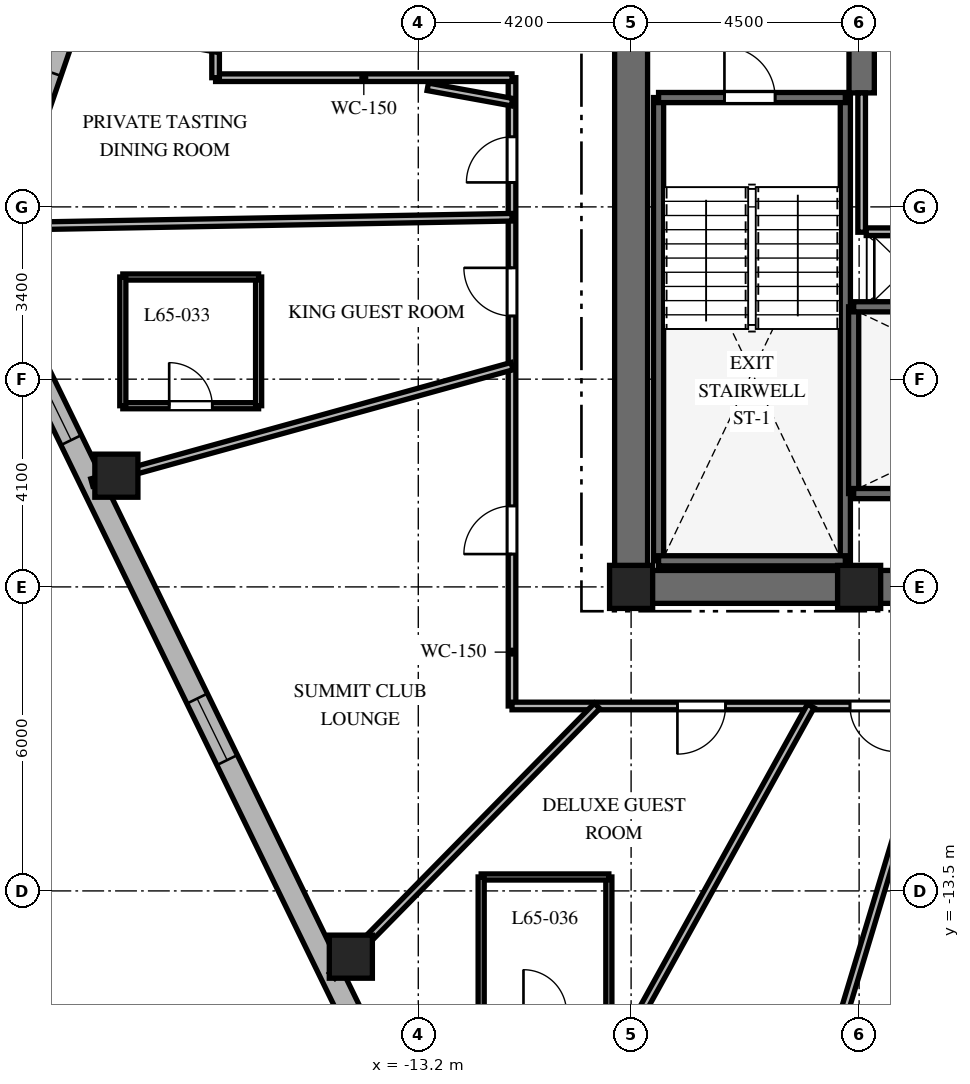
"""IFC4 building model, lengths in metres.
Left out: names, types, materials, properties, quantities, classifications, styles, units other than length and angle.
Written with IfcOpenShell. Run it as: python <this file> out.ifc"""

import sys

from ifc_helpers import new_model, si_unit, direction, frame, frame_2d, origin, origin_2d, place, context, subcontext, project, spatial, rectangle, extrude, element, fill, save


model = new_model("IFC4")
c1 = context("Model", 3, precision=1e-05, world=origin(), true_north=direction((0.0, 1.0)))
c2 = subcontext(c1, "Body", "Model", "MODEL_VIEW")
j1 = project(units=[si_unit("LENGTHUNIT", "METRE"), si_unit("PLANEANGLEUNIT", "RADIAN")], contexts=[c1])
p1 = place(None, origin())
s1 = spatial("IfcSite", under=j1, at=p1, CompositionType="ELEMENT")
p2 = place(p1, origin())
s2 = spatial("IfcBuilding", under=s1, at=p2, CompositionType="ELEMENT")
p3 = place(p2, frame((0.0, 0.0, 261.3)))
s3 = spatial("IfcBuildingStorey", under=s2, at=p3, CompositionType="ELEMENT", Elevation=261.3)
p4 = place(p3, frame((-9.325, -7.5, 0.0), z_axis=(0.0, 0.0, 1.0), x_axis=(1.0, 0.0, 0.0)))
e1 = element("IfcWall", 1, at=p4, inside=s3, PredefinedType="SHEAR", context=c2, shape_type="SweptSolid", body=[
    extrude(rectangle(XDim=18.65, YDim=0.65, at=frame_2d((9.325, 0.0))), origin(), (0.0, 0.0, 1.0), 3.9),
])
p5 = place(p4, frame((9.375, 0.0, 0.0)))
e2 = element("IfcOpeningElement", 2, at=p5, cuts=e1, PredefinedType="OPENING", context=c2, shape_type="SweptSolid", body=[
    extrude(rectangle(XDim=1.0, YDim=2.15, at=frame_2d((0.5, 1.075))), frame((0.0, 0.335, 0.0), z_axis=(0.0, -1.0, 0.0), x_axis=(1.0, 0.0, 0.0)), (0.0, 0.0, 1.0), 0.67),
])
p6 = place(p3, frame((-9.0, -7.175, 0.0), z_axis=(0.0, 0.0, 1.0), x_axis=(0.0, 1.0, 0.0)))
e3 = element("IfcWall", 3, at=p6, inside=s3, PredefinedType="SHEAR", context=c2, shape_type="SweptSolid", body=[
    extrude(rectangle(XDim=14.35, YDim=0.65, at=frame_2d((7.175, 0.0))), origin(), (0.0, 0.0, 1.0), 3.9),
])
p7 = place(p6, frame((10.3, 0.0, 0.0)))
e4 = element("IfcOpeningElement", 4, at=p7, cuts=e3, PredefinedType="OPENING", context=c2, shape_type="SweptSolid", body=[
    extrude(rectangle(XDim=1.05, YDim=2.15, at=frame_2d((0.525, 1.075))), frame((0.0, 0.335, 0.0), z_axis=(0.0, -1.0, 0.0), x_axis=(1.0, 0.0, 0.0)), (0.0, 0.0, 1.0), 0.67),
])
p8 = place(p3, frame((-4.45, 2.25, 0.0), z_axis=(0.0, 0.0, 1.0), x_axis=(0.0, 1.0, 0.0)))
e5 = element("IfcWall", 5, at=p8, inside=s3, PredefinedType="SHEAR", context=c2, shape_type="SweptSolid", body=[
    extrude(rectangle(XDim=4.925, YDim=0.5, at=frame_2d((2.462, 0.0))), origin(), (0.0, 0.0, 1.0), 3.9),
])
for number, where, z_axis, x_axis in (
    (6, (-8.458, -6.985, 0.0), (0.0, 0.0, 1.0), (0.0, 1.0, 0.0)),
    (7, (-4.772, -6.985, 0.0), (0.0, 0.0, 1.0), (0.0, 1.0, 0.0)),
):
    element("IfcWall", number, at=place(p3, frame(where, z_axis=z_axis, x_axis=x_axis)), inside=s3, PredefinedType="SHEAR", context=c2, shape_type="SweptSolid", body=[
        extrude(rectangle(XDim=9.143, YDim=0.2, at=frame_2d((4.572, 0.0))), origin(), (0.0, 0.0, 1.0), 3.9),
    ])
p9 = place(p3, frame((-8.458, -6.985, 0.0), z_axis=(0.0, 0.0, 1.0), x_axis=(1.0, 0.0, 0.0)))
e8 = element("IfcWall", 8, at=p9, inside=s3, PredefinedType="SHEAR", context=c2, shape_type="SweptSolid", body=[
    extrude(rectangle(XDim=3.686, YDim=0.2, at=frame_2d((1.843, 0.0))), origin(), (0.0, 0.0, 1.0), 3.9),
])
p10 = place(p3, frame((-8.458, 2.158, 0.0), z_axis=(0.0, 0.0, 1.0), x_axis=(1.0, 0.0, 0.0)))
e9 = element("IfcWall", 9, at=p10, inside=s3, PredefinedType="SHEAR", context=c2, shape_type="SweptSolid", body=[
    extrude(rectangle(XDim=3.686, YDim=0.2, at=frame_2d((1.843, 0.0))), origin(), (0.0, 0.0, 1.0), 3.9),
])
p11 = place(p10, frame((1.3, 0.0, 0.0)))
e10 = element("IfcOpeningElement", 10, at=p11, cuts=e9, PredefinedType="OPENING", context=c2, shape_type="SweptSolid", body=[
    extrude(rectangle(XDim=1.0, YDim=2.15, at=frame_2d((0.5, 1.075))), frame((0.0, 0.11, 0.0), z_axis=(0.0, -1.0, 0.0), x_axis=(1.0, 0.0, 0.0)), (0.0, 0.0, 1.0), 0.22),
])
p12 = place(p3, frame((-4.608, -5.658, 0.0), z_axis=(0.0, 0.0, 1.0), x_axis=(0.0, 1.0, 0.0)))
e11 = element("IfcWall", 11, at=p12, inside=s3, PredefinedType="SHEAR", context=c2, shape_type="SweptSolid", body=[
    extrude(rectangle(XDim=3.686, YDim=0.2, at=frame_2d((1.843, 0.0))), origin(), (0.0, 0.0, 1.0), 3.9),
])
p13 = place(p3, frame((-4.608, -5.658, 0.0), z_axis=(0.0, 0.0, 1.0), x_axis=(1.0, 0.0, 0.0)))
e12 = element("IfcWall", 12, at=p13, inside=s3, PredefinedType="SHEAR", context=c2, shape_type="SweptSolid", body=[
    extrude(rectangle(XDim=9.166, YDim=0.2, at=frame_2d((4.583, 0.0))), origin(), (0.0, 0.0, 1.0), 3.9),
])
p14 = place(p13, frame((7.45, 0.0, 0.0)))
e13 = element("IfcOpeningElement", 13, at=p14, cuts=e12, PredefinedType="OPENING", context=c2, shape_type="SweptSolid", body=[
    extrude(rectangle(XDim=1.0, YDim=2.15, at=frame_2d((0.5, 1.075))), frame((0.0, 0.11, 0.0), z_axis=(0.0, -1.0, 0.0), x_axis=(1.0, 0.0, 0.0)), (0.0, 0.0, 1.0), 0.22),
])
p15 = place(p3, frame((-4.608, -1.972, 0.0), z_axis=(0.0, 0.0, 1.0), x_axis=(1.0, 0.0, 0.0)))
e14 = element("IfcWall", 14, at=p15, inside=s3, PredefinedType="SHEAR", context=c2, shape_type="SweptSolid", body=[
    extrude(rectangle(XDim=9.166, YDim=0.2, at=frame_2d((4.583, 0.0))), origin(), (0.0, 0.0, 1.0), 3.9),
])
for number, where, z_axis, x_axis in (
    (15, (-9.0, -7.5, 0.0), (0.0, 0.0, 1.0), (1.0, 0.0, 0.0)),
    (16, (-4.5, -7.5, 0.0), (0.0, 0.0, 1.0), (1.0, 0.0, 0.0)),
    (17, (-19.158, -5.305, 0.0), (0.0, 0.0, 1.0), (1.0, 0.0, 0.0)),
    (18, (-14.531, -14.798, 0.0), (0.0, 0.0, 1.0), (1.0, 0.0, 0.0)),
):
    element("IfcColumn", number, at=place(p3, frame(where, z_axis=z_axis, x_axis=x_axis)), inside=s3, PredefinedType="COLUMN", context=c2, shape_type="SweptSolid", body=[
        extrude(rectangle(XDim=0.85, YDim=0.85, at=origin_2d()), origin(), (0.0, 0.0, 1.0), 3.9),
    ])
p16 = place(p3, frame((-15.26, 17.776, 0.0), z_axis=(0.0, 0.0, 1.0), x_axis=(-0.325407437101, -0.945573899745, 0.0)))
e19 = element("IfcWall", 19, at=p16, inside=s3, PredefinedType="SOLIDWALL", context=c2, shape_type="SweptSolid", body=[
    extrude(rectangle(XDim=18.552, YDim=0.45, at=frame_2d((9.276, 0.0))), origin(), (0.0, 0.0, 1.0), 3.6),
])
p17 = place(p16, frame((4.602, 0.0, 0.0)))
e20 = element("IfcOpeningElement", 20, at=p17, cuts=e19, PredefinedType="OPENING", context=c2, shape_type="SweptSolid", body=[
    extrude(rectangle(XDim=1.0, YDim=2.15, at=frame_2d((0.5, 1.075))), frame((0.0, 0.235, 0.0), z_axis=(0.0, -1.0, 0.0), x_axis=(1.0, 0.0, 0.0)), (0.0, 0.0, 1.0), 0.47),
])
p18 = place(p16, frame((1.161, 0.0, 0.8)))
e21 = element("IfcOpeningElement", 21, at=p18, cuts=e19, PredefinedType="OPENING", context=c2, shape_type="SweptSolid", body=[
    extrude(rectangle(XDim=1.35, YDim=1.75, at=frame_2d((0.675, 0.875))), frame((0.0, 0.235, 0.0), z_axis=(0.0, -1.0, 0.0), x_axis=(1.0, 0.0, 0.0)), (0.0, 0.0, 1.0), 0.47),
])
p19 = place(p16, frame((6.379, 0.0, 0.8)))
e22 = element("IfcOpeningElement", 22, at=p19, cuts=e19, PredefinedType="OPENING", context=c2, shape_type="SweptSolid", body=[
    extrude(rectangle(XDim=1.35, YDim=1.75, at=frame_2d((0.675, 0.875))), frame((0.0, 0.235, 0.0), z_axis=(0.0, -1.0, 0.0), x_axis=(1.0, 0.0, 0.0)), (0.0, 0.0, 1.0), 0.47),
])
p20 = place(p16, frame((11.561, 0.0, 0.8)))
e23 = element("IfcOpeningElement", 23, at=p20, cuts=e19, PredefinedType="OPENING", context=c2, shape_type="SweptSolid", body=[
    extrude(rectangle(XDim=1.35, YDim=1.75, at=frame_2d((0.675, 0.875))), frame((0.0, 0.235, 0.0), z_axis=(0.0, -1.0, 0.0), x_axis=(1.0, 0.0, 0.0)), (0.0, 0.0, 1.0), 0.47),
])
p21 = place(p16, frame((15.987, 0.0, 0.8)))
e24 = element("IfcOpeningElement", 24, at=p21, cuts=e19, PredefinedType="OPENING", context=c2, shape_type="SweptSolid", body=[
    extrude(rectangle(XDim=1.35, YDim=1.75, at=frame_2d((0.675, 0.875))), frame((0.0, 0.235, 0.0), z_axis=(0.0, -1.0, 0.0), x_axis=(1.0, 0.0, 0.0)), (0.0, 0.0, 1.0), 0.47),
])
p22 = place(p3, frame((-21.138, -2.371, 0.0), z_axis=(0.0, 0.0, 1.0), x_axis=(0.438128124058, -0.89891253574, 0.0)))
e25 = element("IfcWall", 25, at=p22, inside=s3, PredefinedType="SOLIDWALL", context=c2, shape_type="SweptSolid", body=[
    extrude(rectangle(XDim=17.565, YDim=0.45, at=frame_2d((8.782, 0.0))), origin(), (0.0, 0.0, 1.0), 3.6),
])
p23 = place(p22, frame((1.133, 0.0, 0.8)))
e26 = element("IfcOpeningElement", 26, at=p23, cuts=e25, PredefinedType="OPENING", context=c2, shape_type="SweptSolid", body=[
    extrude(rectangle(XDim=1.35, YDim=1.75, at=frame_2d((0.675, 0.875))), frame((0.0, 0.235, 0.0), z_axis=(0.0, -1.0, 0.0), x_axis=(1.0, 0.0, 0.0)), (0.0, 0.0, 1.0), 0.47),
])
p24 = place(p22, frame((8.158, 0.0, 0.8)))
e27 = element("IfcOpeningElement", 27, at=p24, cuts=e25, PredefinedType="OPENING", context=c2, shape_type="SweptSolid", body=[
    extrude(rectangle(XDim=1.35, YDim=1.75, at=frame_2d((0.675, 0.875))), frame((0.0, 0.235, 0.0), z_axis=(0.0, -1.0, 0.0), x_axis=(1.0, 0.0, 0.0)), (0.0, 0.0, 1.0), 0.47),
])
p25 = place(p22, frame((15.132, 0.0, 0.8)))
e28 = element("IfcOpeningElement", 28, at=p25, cuts=e25, PredefinedType="OPENING", context=c2, shape_type="SweptSolid", body=[
    extrude(rectangle(XDim=1.35, YDim=1.75, at=frame_2d((0.675, 0.875))), frame((0.0, 0.235, 0.0), z_axis=(0.0, -1.0, 0.0), x_axis=(1.0, 0.0, 0.0)), (0.0, 0.0, 1.0), 0.47),
])
p26 = place(p3, frame((-4.45, -0.5, 0.0), z_axis=(0.0, 0.0, 1.0), x_axis=(0.0, 1.0, 0.0)))
e29 = element("IfcWall", 29, at=p26, inside=s3, PredefinedType="PARTITIONING", context=c2, shape_type="SweptSolid", body=[
    extrude(rectangle(XDim=2.75, YDim=0.15, at=frame_2d((1.375, 0.0))), origin(), (0.0, 0.0, 1.0), 3.6),
])
p27 = place(p3, frame((-4.36, -0.49, 0.0), z_axis=(0.0, 0.0, 1.0), x_axis=(1.0, 0.0, 0.0)))
e30 = element("IfcWall", 30, at=p27, inside=s3, PredefinedType="PARTITIONING", context=c2, shape_type="SweptSolid", body=[
    extrude(rectangle(XDim=8.72, YDim=0.15, at=frame_2d((4.36, 0.0))), origin(), (0.0, 0.0, 1.0), 3.6),
])
p28 = place(p27, frame((2.81, 0.0, 0.0)))
e31 = element("IfcOpeningElement", 31, at=p28, cuts=e30, PredefinedType="OPENING", context=c2, shape_type="SweptSolid", body=[
    extrude(rectangle(XDim=0.85, YDim=2.03, at=frame_2d((0.425, 1.015))), frame((0.0, 0.085, 0.0), z_axis=(0.0, -1.0, 0.0), x_axis=(1.0, 0.0, 0.0)), (0.0, 0.0, 1.0), 0.17),
])
p29 = place(p27, frame((4.61, 0.0, 0.0)))
e32 = element("IfcOpeningElement", 32, at=p29, cuts=e30, PredefinedType="OPENING", context=c2, shape_type="SweptSolid", body=[
    extrude(rectangle(XDim=0.85, YDim=2.03, at=frame_2d((0.425, 1.015))), frame((0.0, 0.085, 0.0), z_axis=(0.0, -1.0, 0.0), x_axis=(1.0, 0.0, 0.0)), (0.0, 0.0, 1.0), 0.17),
])
p30 = place(p3, frame((-11.35, -9.85, 0.0), z_axis=(0.0, 0.0, 1.0), x_axis=(0.0, 1.0, 0.0)))
e33 = element("IfcWall", 33, at=p30, inside=s3, PredefinedType="PARTITIONING", context=c2, shape_type="SweptSolid", body=[
    extrude(rectangle(XDim=12.4, YDim=0.15, at=frame_2d((6.2, 0.0))), origin(), (0.0, 0.0, 1.0), 3.09),
])
p31 = place(p30, frame((10.333, 0.0, 0.0)))
e34 = element("IfcOpeningElement", 34, at=p31, cuts=e33, PredefinedType="OPENING", context=c2, shape_type="SweptSolid", body=[
    extrude(rectangle(XDim=0.9, YDim=2.03, at=frame_2d((0.45, 1.015))), frame((0.0, 0.085, 0.0), z_axis=(0.0, -1.0, 0.0), x_axis=(1.0, 0.0, 0.0)), (0.0, 0.0, 1.0), 0.17),
])
p32 = place(p30, frame((7.697, 0.0, 0.0)))
e35 = element("IfcOpeningElement", 35, at=p32, cuts=e33, PredefinedType="OPENING", context=c2, shape_type="SweptSolid", body=[
    extrude(rectangle(XDim=0.95, YDim=2.03, at=frame_2d((0.475, 1.015))), frame((0.0, 0.085, 0.0), z_axis=(0.0, -1.0, 0.0), x_axis=(1.0, 0.0, 0.0)), (0.0, 0.0, 1.0), 0.17),
])
p33 = place(p30, frame((2.998, 0.0, 0.0)))
e36 = element("IfcOpeningElement", 36, at=p33, cuts=e33, PredefinedType="OPENING", context=c2, shape_type="SweptSolid", body=[
    extrude(rectangle(XDim=0.95, YDim=2.03, at=frame_2d((0.475, 1.015))), frame((0.0, 0.085, 0.0), z_axis=(0.0, -1.0, 0.0), x_axis=(1.0, 0.0, 0.0)), (0.0, 0.0, 1.0), 0.17),
])
p34 = place(p3, frame((-11.35, 2.55, 0.0), z_axis=(0.0, 0.0, 1.0), x_axis=(-1.0, 0.0, 0.0)))
e37 = element("IfcWall", 37, at=p34, inside=s3, PredefinedType="PARTITIONING", context=c2, shape_type="SweptSolid", body=[
    extrude(rectangle(XDim=5.85, YDim=0.15, at=frame_2d((2.925, 0.0))), origin(), (0.0, 0.0, 1.0), 3.041),
])
p35 = place(p3, frame((-17.2, 2.55, 0.0), z_axis=(0.0, 0.0, 1.0), x_axis=(0.0, 1.0, 0.0)))
e38 = element("IfcWall", 38, at=p35, inside=s3, PredefinedType="PARTITIONING", context=c2, shape_type="SweptSolid", body=[
    extrude(rectangle(XDim=1.85, YDim=0.15, at=frame_2d((0.925, 0.0))), origin(), (0.0, 0.0, 1.0), 3.09),
])
p36 = place(p3, frame((-0.92, -9.85, 0.0), z_axis=(0.0, 0.0, 1.0), x_axis=(-1.0, 0.0, 0.0)))
e39 = element("IfcWall", 39, at=p36, inside=s3, PredefinedType="PARTITIONING", context=c2, shape_type="SweptSolid", body=[
    extrude(rectangle(XDim=10.43, YDim=0.15, at=frame_2d((5.215, 0.0))), origin(), (0.0, 0.0, 1.0), 3.09),
])
p37 = place(p36, frame((6.216, 0.0, 0.0)))
e40 = element("IfcOpeningElement", 40, at=p37, cuts=e39, PredefinedType="OPENING", context=c2, shape_type="SweptSolid", body=[
    extrude(rectangle(XDim=0.95, YDim=2.03, at=frame_2d((0.475, 1.015))), frame((0.0, 0.085, 0.0), z_axis=(0.0, -1.0, 0.0), x_axis=(1.0, 0.0, 0.0)), (0.0, 0.0, 1.0), 0.17),
])
p38 = place(p36, frame((2.86, 0.0, 0.0)))
e41 = element("IfcOpeningElement", 41, at=p38, cuts=e39, PredefinedType="OPENING", context=c2, shape_type="SweptSolid", body=[
    extrude(rectangle(XDim=0.9, YDim=2.03, at=frame_2d((0.45, 1.015))), frame((0.0, 0.085, 0.0), z_axis=(0.0, -1.0, 0.0), x_axis=(1.0, 0.0, 0.0)), (0.0, 0.0, 1.0), 0.17),
])
p39 = place(p3, frame((-11.35, 2.067, 0.0), z_axis=(0.0, 0.0, 1.0), x_axis=(-0.983807459651, 0.179228575665, 0.0)))
e42 = element("IfcWall", 42, at=p39, inside=s3, PredefinedType="PARTITIONING", context=c2, shape_type="SweptSolid", body=[
    extrude(rectangle(XDim=1.69, YDim=0.15, at=frame_2d((0.845, 0.0))), origin(), (0.0, 0.0, 1.0), 3.6),
])
p40 = place(p3, frame((-11.35, -0.204, 0.0), z_axis=(0.0, 0.0, 1.0), x_axis=(-0.999838748671, -0.017957635019, 0.0)))
e43 = element("IfcWall", 43, at=p40, inside=s3, PredefinedType="PARTITIONING", context=c2, shape_type="SweptSolid", body=[
    extrude(rectangle(XDim=9.911, YDim=0.15, at=frame_2d((4.956, 0.0))), origin(), (0.0, 0.0, 1.0), 2.94),
])
p41 = place(p3, frame((-11.35, -3.143, 0.0), z_axis=(0.0, 0.0, 1.0), x_axis=(-0.963731818141, -0.266872596386, 0.0)))
e44 = element("IfcWall", 44, at=p41, inside=s3, PredefinedType="PARTITIONING", context=c2, shape_type="SweptSolid", body=[
    extrude(rectangle(XDim=8.605, YDim=0.15, at=frame_2d((4.302, 0.0))), origin(), (0.0, 0.0, 1.0), 2.94),
])
p42 = place(p3, frame((-9.672, -9.85, 0.0), z_axis=(0.0, 0.0, 1.0), x_axis=(-0.700629771301, -0.713524998558, 0.0)))
e45 = element("IfcWall", 45, at=p42, inside=s3, PredefinedType="PARTITIONING", context=c2, shape_type="SweptSolid", body=[
    extrude(rectangle(XDim=7.459, YDim=0.15, at=frame_2d((3.73, 0.0))), origin(), (0.0, 0.0, 1.0), 2.94),
])
p43 = place(p3, frame((-5.454, -9.85, 0.0), z_axis=(0.0, 0.0, 1.0), x_axis=(-0.48439420613, -0.874849846012, 0.0)))
e46 = element("IfcWall", 46, at=p43, inside=s3, PredefinedType="PARTITIONING", context=c2, shape_type="SweptSolid", body=[
    extrude(rectangle(XDim=11.375, YDim=0.15, at=frame_2d((5.688, 0.0))), origin(), (0.0, 0.0, 1.0), 2.94),
])
p44 = place(p3, frame((-2.972, -9.85, 0.0), z_axis=(0.0, 0.0, 1.0), x_axis=(-0.288872169679, -0.957367677324, 0.0)))
e47 = element("IfcWall", 47, at=p44, inside=s3, PredefinedType="PARTITIONING", context=c2, shape_type="SweptSolid", body=[
    extrude(rectangle(XDim=10.68, YDim=0.15, at=frame_2d((5.34, 0.0))), origin(), (0.0, 0.0, 1.0), 2.94),
])
p45 = place(p3, frame((-19.031, -3.924, 0.0), z_axis=(0.0, 0.0, 1.0), x_axis=(1.0, 0.0, 0.0)))
e48 = element("IfcWall", 48, at=p45, inside=s3, PredefinedType="PARTITIONING", context=c2, shape_type="SweptSolid", body=[
    extrude(rectangle(XDim=2.68, YDim=0.12, at=frame_2d((1.34, 0.0))), origin(), (0.0, 0.0, 1.0), 3.6),
])
p46 = place(p45, frame((0.915, 0.0, 0.0)))
e49 = element("IfcOpeningElement", 49, at=p46, cuts=e48, PredefinedType="OPENING", context=c2, shape_type="SweptSolid", body=[
    extrude(rectangle(XDim=0.85, YDim=2.03, at=frame_2d((0.425, 1.015))), frame((0.0, 0.07, 0.0), z_axis=(0.0, -1.0, 0.0), x_axis=(1.0, 0.0, 0.0)), (0.0, 0.0, 1.0), 0.14),
])
p47 = place(p3, frame((-16.351, -3.924, 0.0), z_axis=(0.0, 0.0, 1.0), x_axis=(0.0, 1.0, 0.0)))
e50 = element("IfcWall", 50, at=p47, inside=s3, PredefinedType="PARTITIONING", context=c2, shape_type="SweptSolid", body=[
    extrude(rectangle(XDim=2.54, YDim=0.12, at=frame_2d((1.27, 0.0))), origin(), (0.0, 0.0, 1.0), 3.6),
])
p48 = place(p3, frame((-16.351, -1.384, 0.0), z_axis=(0.0, 0.0, 1.0), x_axis=(-1.0, 0.0, 0.0)))
e51 = element("IfcWall", 51, at=p48, inside=s3, PredefinedType="PARTITIONING", context=c2, shape_type="SweptSolid", body=[
    extrude(rectangle(XDim=2.68, YDim=0.12, at=frame_2d((1.34, 0.0))), origin(), (0.0, 0.0, 1.0), 3.6),
])
p49 = place(p3, frame((-19.031, -1.384, 0.0), z_axis=(0.0, 0.0, 1.0), x_axis=(0.0, -1.0, 0.0)))
e52 = element("IfcWall", 52, at=p49, inside=s3, PredefinedType="PARTITIONING", context=c2, shape_type="SweptSolid", body=[
    extrude(rectangle(XDim=2.54, YDim=0.12, at=frame_2d((1.27, 0.0))), origin(), (0.0, 0.0, 1.0), 2.94),
])
p50 = place(p3, frame((-9.439, -15.905, 0.0), z_axis=(0.0, 0.0, 1.0), x_axis=(0.0, 1.0, 0.0)))
e53 = element("IfcWall", 53, at=p50, inside=s3, PredefinedType="PARTITIONING", context=c2, shape_type="SweptSolid", body=[
    extrude(rectangle(XDim=2.68, YDim=0.12, at=frame_2d((1.34, 0.0))), origin(), (0.0, 0.0, 1.0), 3.172),
])
p51 = place(p3, frame((-9.439, -13.225, 0.0), z_axis=(0.0, 0.0, 1.0), x_axis=(-1.0, 0.0, 0.0)))
e54 = element("IfcWall", 54, at=p51, inside=s3, PredefinedType="PARTITIONING", context=c2, shape_type="SweptSolid", body=[
    extrude(rectangle(XDim=2.52, YDim=0.12, at=frame_2d((1.26, 0.0))), origin(), (0.0, 0.0, 1.0), 3.172),
])
p52 = place(p3, frame((-11.959, -13.225, 0.0), z_axis=(0.0, 0.0, 1.0), x_axis=(0.0, -1.0, 0.0)))
e55 = element("IfcWall", 55, at=p52, inside=s3, PredefinedType="PARTITIONING", context=c2, shape_type="SweptSolid", body=[
    extrude(rectangle(XDim=2.68, YDim=0.12, at=frame_2d((1.34, 0.0))), origin(), (0.0, 0.0, 1.0), 3.6),
])
p53 = place(p23, origin())
e56 = element("IfcWindow", 56, at=p53, inside=s3, PartitioningType="SINGLE_PANEL", PredefinedType="WINDOW", context=c2, shape_type="SweptSolid", body=[
    extrude(rectangle(XDim=1.35, YDim=1.75, at=frame_2d((0.675, 0.875))), frame((0.0, 0.03, 0.0), z_axis=(0.0, -1.0, 0.0), x_axis=(1.0, 0.0, 0.0)), (0.0, 0.0, 1.0), 0.06),
])
fill(e26, e56)
p54 = place(p24, origin())
e57 = element("IfcWindow", 57, at=p54, inside=s3, PartitioningType="SINGLE_PANEL", PredefinedType="WINDOW", context=c2, shape_type="SweptSolid", body=[
    extrude(rectangle(XDim=1.35, YDim=1.75, at=frame_2d((0.675, 0.875))), frame((0.0, 0.03, 0.0), z_axis=(0.0, -1.0, 0.0), x_axis=(1.0, 0.0, 0.0)), (0.0, 0.0, 1.0), 0.06),
])
fill(e27, e57)
p55 = place(p11, origin())
e58 = element("IfcDoor", 58, at=p55, inside=s3, OperationType="SINGLE_SWING_LEFT", PredefinedType="DOOR", context=c2, shape_type="SweptSolid", body=[
    extrude(rectangle(XDim=1.0, YDim=2.15, at=frame_2d((0.5, 1.075))), frame((0.0, 0.025, 0.0), z_axis=(0.0, -1.0, 0.0), x_axis=(1.0, 0.0, 0.0)), (0.0, 0.0, 1.0), 0.05),
])
fill(e10, e58)
p56 = place(p31, origin())
e59 = element("IfcDoor", 59, at=p56, inside=s3, OperationType="SINGLE_SWING_LEFT", PredefinedType="DOOR", context=c2, shape_type="SweptSolid", body=[
    extrude(rectangle(XDim=0.9, YDim=2.03, at=frame_2d((0.45, 1.015))), frame((0.0, 0.025, 0.0), z_axis=(0.0, -1.0, 0.0), x_axis=(1.0, 0.0, 0.0)), (0.0, 0.0, 1.0), 0.05),
])
fill(e34, e59)
p57 = place(p32, origin())
e60 = element("IfcDoor", 60, at=p57, inside=s3, OperationType="SINGLE_SWING_RIGHT", PredefinedType="DOOR", context=c2, shape_type="SweptSolid", body=[
    extrude(rectangle(XDim=0.95, YDim=2.03, at=frame_2d((0.475, 1.015))), frame((0.0, 0.025, 0.0), z_axis=(0.0, -1.0, 0.0), x_axis=(1.0, 0.0, 0.0)), (0.0, 0.0, 1.0), 0.05),
])
fill(e35, e60)
p58 = place(p46, origin())
e61 = element("IfcDoor", 61, at=p58, inside=s3, OperationType="SINGLE_SWING_LEFT", PredefinedType="DOOR", context=c2, shape_type="SweptSolid", body=[
    extrude(rectangle(XDim=0.85, YDim=2.03, at=frame_2d((0.425, 1.015))), frame((0.0, 0.025, 0.0), z_axis=(0.0, -1.0, 0.0), x_axis=(1.0, 0.0, 0.0)), (0.0, 0.0, 1.0), 0.05),
])
fill(e49, e61)
p59 = place(p33, origin())
e62 = element("IfcDoor", 62, at=p59, inside=s3, OperationType="SINGLE_SWING_LEFT", PredefinedType="DOOR", context=c2, shape_type="SweptSolid", body=[
    extrude(rectangle(XDim=0.95, YDim=2.03, at=frame_2d((0.475, 1.015))), frame((0.0, 0.025, 0.0), z_axis=(0.0, -1.0, 0.0), x_axis=(1.0, 0.0, 0.0)), (0.0, 0.0, 1.0), 0.05),
])
fill(e36, e62)
p60 = place(p37, origin())
e63 = element("IfcDoor", 63, at=p60, inside=s3, OperationType="SINGLE_SWING_RIGHT", PredefinedType="DOOR", context=c2, shape_type="SweptSolid", body=[
    extrude(rectangle(XDim=0.95, YDim=2.03, at=frame_2d((0.475, 1.015))), frame((0.0, 0.025, 0.0), z_axis=(0.0, -1.0, 0.0), x_axis=(1.0, 0.0, 0.0)), (0.0, 0.0, 1.0), 0.05),
])
fill(e40, e63)
p61 = place(p38, origin())
e64 = element("IfcDoor", 64, at=p61, inside=s3, OperationType="SINGLE_SWING_LEFT", PredefinedType="DOOR", context=c2, shape_type="SweptSolid", body=[
    extrude(rectangle(XDim=0.9, YDim=2.03, at=frame_2d((0.45, 1.015))), frame((0.0, 0.025, 0.0), z_axis=(0.0, -1.0, 0.0), x_axis=(1.0, 0.0, 0.0)), (0.0, 0.0, 1.0), 0.05),
])
fill(e41, e64)
save(model, sys.argv[1])
